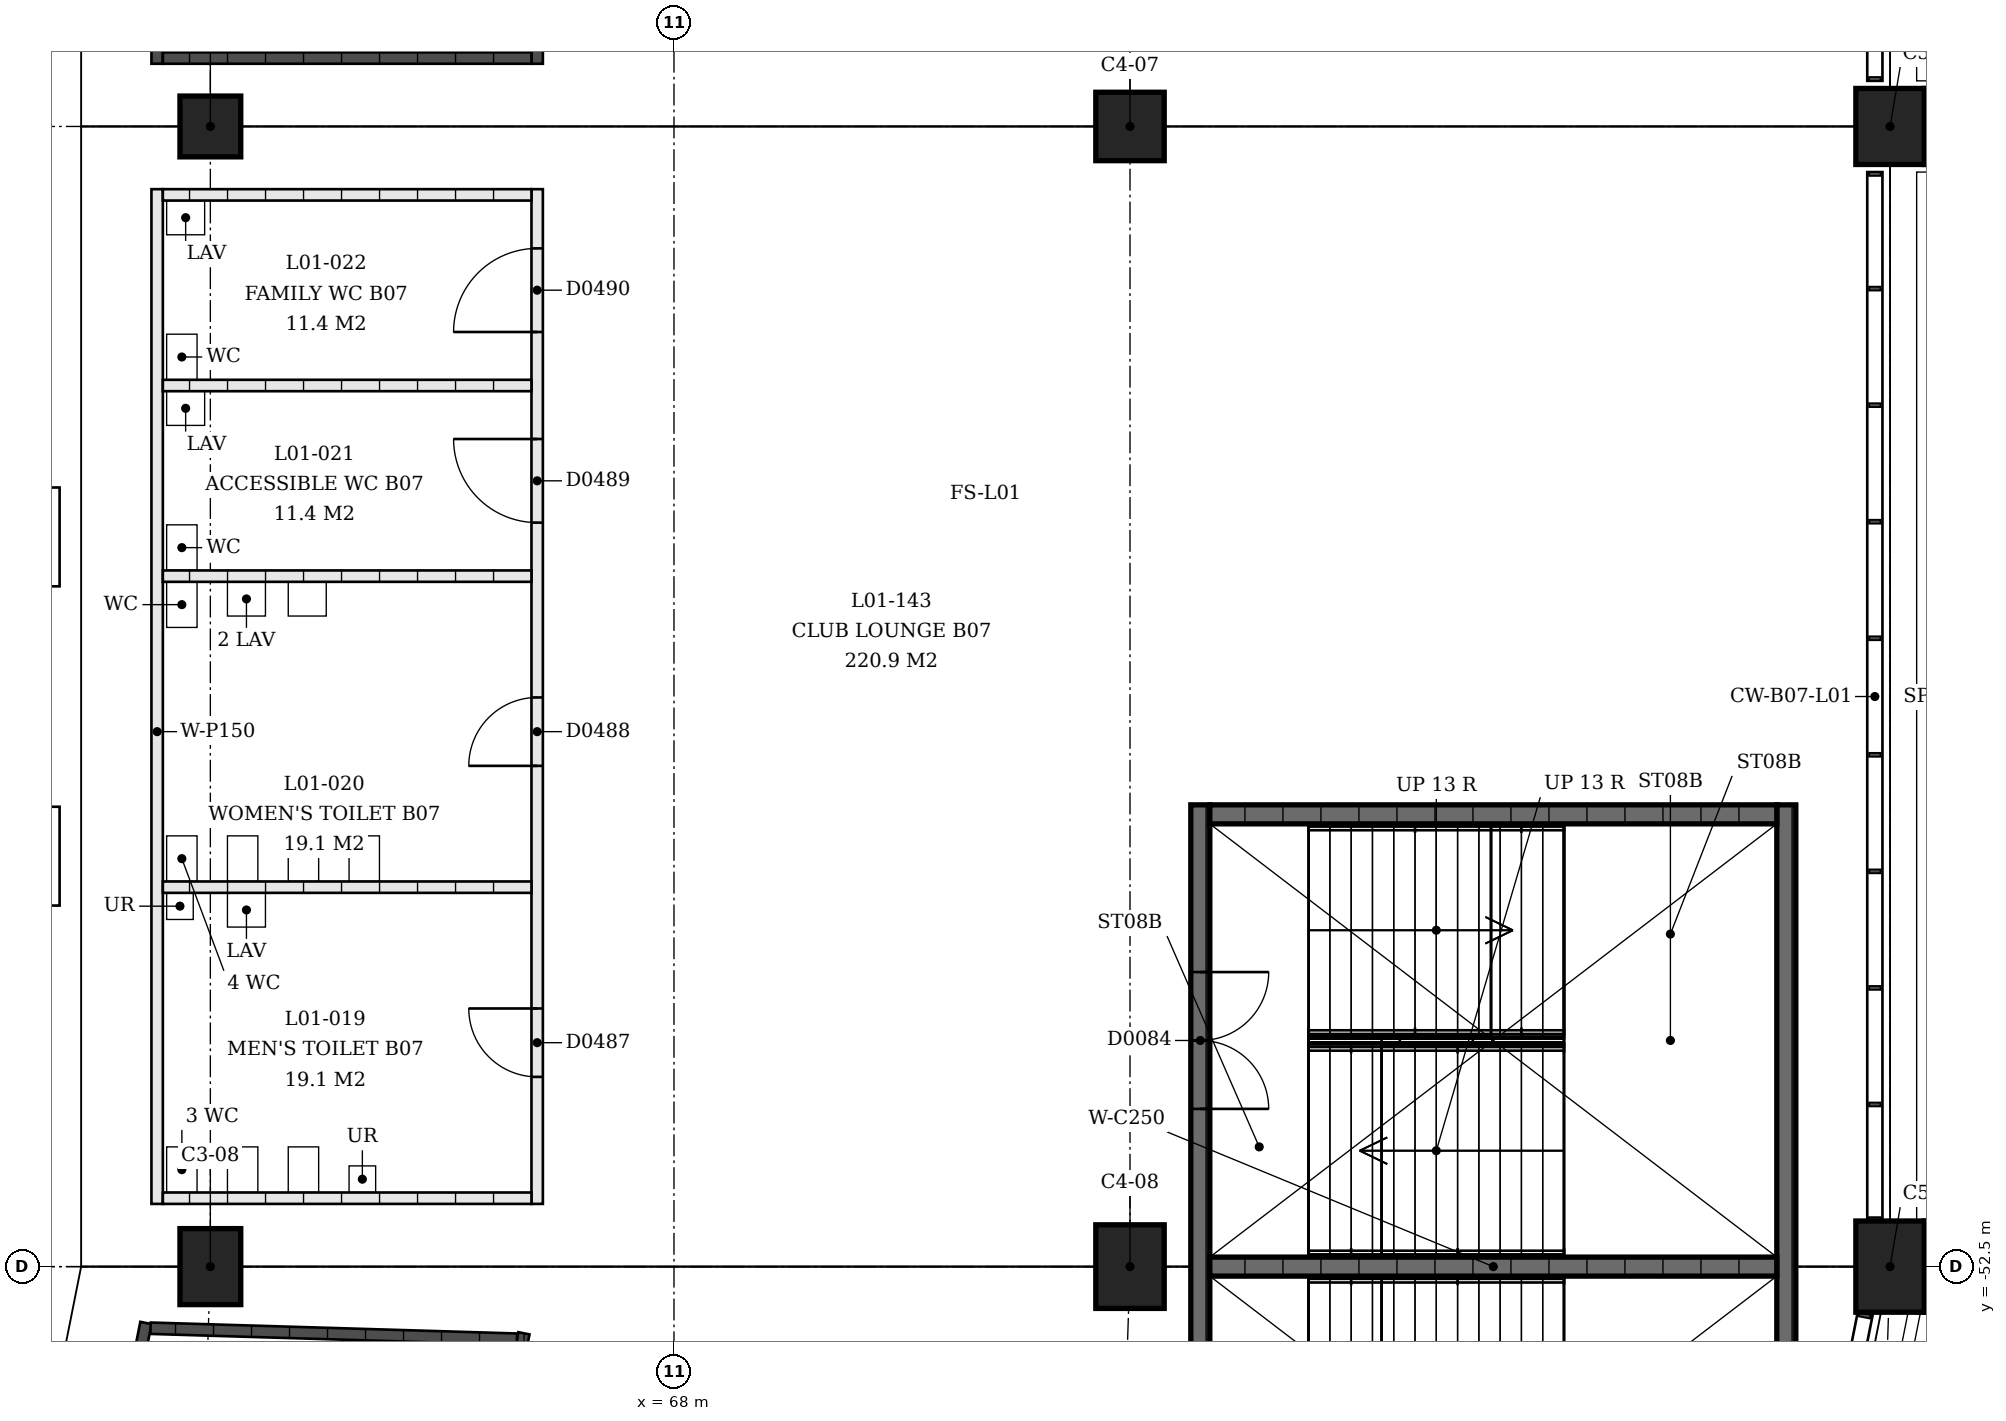
"""IFC4 building model, lengths in metres.
Left out: names, types, materials, properties, quantities, classifications, styles, units other than length and angle.
Written with IfcOpenShell. Run it as: python <this file> out.ifc"""

import sys

from ifc_helpers import new_model, si_unit, direction, frame, frame_2d, origin, origin_2d, place, context, subcontext, project, spatial, rectangle, extrude, element, fill, save


model = new_model("IFC4")
c1 = context("Model", 3, precision=1e-05, world=origin(), true_north=direction((0.0, 1.0)))
c2 = subcontext(c1, "Body", "Model", "MODEL_VIEW")
j1 = project(units=[si_unit("LENGTHUNIT", "METRE"), si_unit("PLANEANGLEUNIT", "RADIAN")], contexts=[c1])
p1 = place(None, origin())
s1 = spatial("IfcSite", under=j1, at=p1, CompositionType="ELEMENT")
p2 = place(p1, origin())
s2 = spatial("IfcBuilding", under=s1, at=p2, CompositionType="ELEMENT")
p3 = place(p2, frame((0.0, 0.0, 4.5)))
s3 = spatial("IfcBuildingStorey", under=s2, at=p3, CompositionType="ELEMENT", Elevation=4.5)
p4 = place(p3, frame((61.9, -37.5, 0.0), z_axis=(0.0, 0.0, 1.0), x_axis=(0.0, 1.0, 0.0)))
e1 = element("IfcColumn", 1, at=p4, inside=s3, PredefinedType="COLUMN", context=c2, shape_type="SweptSolid", body=[
    extrude(rectangle(XDim=0.8, YDim=0.8, at=origin_2d()), origin(), (0.0, 0.0, 1.0), 4.5),
])
p5 = place(p3, frame((74.0, -37.5, 0.0), z_axis=(0.0, 0.0, 1.0), x_axis=(0.0, 1.0, 0.0)))
e2 = element("IfcColumn", 2, at=p5, inside=s3, PredefinedType="COLUMN", context=c2, shape_type="SweptSolid", body=[
    extrude(rectangle(XDim=0.9, YDim=0.9, at=origin_2d()), origin(), (0.0, 0.0, 1.0), 4.5),
])
p6 = place(p3, frame((84.0, -37.5, 0.0), z_axis=(0.0, 0.0, 1.0), x_axis=(0.0, 1.0, 0.0)))
e3 = element("IfcColumn", 3, at=p6, inside=s3, PredefinedType="COLUMN", context=c2, shape_type="SweptSolid", body=[
    extrude(rectangle(XDim=1.0, YDim=0.9, at=origin_2d()), origin(), (0.0, 0.0, 1.0), 4.5),
])
p7 = place(p3, frame((61.9, -52.5, 0.0), z_axis=(0.0, 0.0, 1.0), x_axis=(0.0, 1.0, 0.0)))
e4 = element("IfcColumn", 4, at=p7, inside=s3, PredefinedType="COLUMN", context=c2, shape_type="SweptSolid", body=[
    extrude(rectangle(XDim=1.0, YDim=0.8, at=origin_2d()), origin(), (0.0, 0.0, 1.0), 4.5),
])
p8 = place(p3, frame((74.0, -52.5, 0.0), z_axis=(0.0, 0.0, 1.0), x_axis=(0.0, 1.0, 0.0)))
e5 = element("IfcColumn", 5, at=p8, inside=s3, PredefinedType="COLUMN", context=c2, shape_type="SweptSolid", body=[
    extrude(rectangle(XDim=1.1, YDim=0.9, at=origin_2d()), origin(), (0.0, 0.0, 1.0), 4.5),
])
p9 = place(p3, frame((84.0, -52.5, 0.0), z_axis=(0.0, 0.0, 1.0), x_axis=(0.0, 1.0, 0.0)))
e6 = element("IfcColumn", 6, at=p9, inside=s3, PredefinedType="COLUMN", context=c2, shape_type="SweptSolid", body=[
    extrude(rectangle(XDim=1.2, YDim=0.9, at=origin_2d()), origin(), (0.0, 0.0, 1.0), 4.5),
])
p10 = place(p3, frame((74.925, -58.575, 0.0), z_axis=(0.0, 0.0, 1.0), x_axis=(0.0, 1.0, 0.0)))
e7 = element("IfcWall", 7, at=p10, inside=s3, PredefinedType="SHEAR", context=c2, shape_type="SweptSolid", body=[
    extrude(rectangle(XDim=12.15, YDim=0.25, at=frame_2d((6.075, 0.0))), origin(), (0.0, 0.0, 1.0), 4.09),
])
p11 = place(p10, frame((2.2, 0.0, 0.0)))
e8 = element("IfcOpeningElement", 8, at=p11, cuts=e7, PredefinedType="OPENING", context=c2, shape_type="SweptSolid", body=[
    extrude(rectangle(XDim=1.8, YDim=2.1, at=frame_2d((0.9, 1.05))), frame((0.0, 0.125, 0.0), z_axis=(0.0, -1.0, 0.0), x_axis=(1.0, 0.0, 0.0)), (0.0, 0.0, 1.0), 0.25),
])
p12 = place(p10, frame((8.15, 0.0, 0.0)))
e9 = element("IfcOpeningElement", 9, at=p12, cuts=e7, PredefinedType="OPENING", context=c2, shape_type="SweptSolid", body=[
    extrude(rectangle(XDim=1.8, YDim=2.1, at=frame_2d((0.9, 1.05))), frame((0.0, 0.125, 0.0), z_axis=(0.0, -1.0, 0.0), x_axis=(1.0, 0.0, 0.0)), (0.0, 0.0, 1.0), 0.25),
])
p13 = place(p3, frame((82.635, -58.575, 0.0), z_axis=(0.0, 0.0, 1.0), x_axis=(0.0, 1.0, 0.0)))
e10 = element("IfcWall", 10, at=p13, inside=s3, PredefinedType="SHEAR", context=c2, shape_type="SweptSolid", body=[
    extrude(rectangle(XDim=12.15, YDim=0.25, at=frame_2d((6.075, 0.0))), origin(), (0.0, 0.0, 1.0), 4.09),
])
for number, where, z_axis, x_axis in (
    (11, (75.05, -46.55, 0.0), (0.0, 0.0, 1.0), (1.0, 0.0, 0.0)),
    (12, (75.05, -52.5, 0.0), (0.0, 0.0, 1.0), (1.0, 0.0, 0.0)),
):
    element("IfcWall", number, at=place(p3, frame(where, z_axis=z_axis, x_axis=x_axis)), inside=s3, PredefinedType="SHEAR", context=c2, shape_type="SweptSolid", body=[
        extrude(rectangle(XDim=7.46, YDim=0.25, at=frame_2d((3.73, 0.0))), origin(), (0.0, 0.0, 1.0), 4.09),
    ])
p14 = place(p3, frame((61.2, -23.325, 0.0), z_axis=(0.0, 0.0, 1.0), x_axis=(0.0, -1.0, 0.0)))
e13 = element("IfcWall", 13, at=p14, inside=s3, PredefinedType="SOLIDWALL", context=c2, shape_type="SweptSolid", body=[
    extrude(rectangle(XDim=13.35, YDim=0.15, at=frame_2d((6.675, 0.0))), origin(), (0.0, 0.0, 1.0), 3.0),
])
p15 = place(p3, frame((66.2, -23.325, 0.0), z_axis=(0.0, 0.0, 1.0), x_axis=(0.0, -1.0, 0.0)))
e14 = element("IfcWall", 14, at=p15, inside=s3, PredefinedType="SOLIDWALL", context=c2, shape_type="SweptSolid", body=[
    extrude(rectangle(XDim=13.35, YDim=0.15, at=frame_2d((6.675, 0.0))), origin(), (0.0, 0.0, 1.0), 3.0),
])
p16 = place(p15, frame((2.875, 0.0, 0.0)))
e15 = element("IfcOpeningElement", 15, at=p16, cuts=e14, PredefinedType="OPENING", context=c2, shape_type="SweptSolid", body=[
    extrude(rectangle(XDim=1.0, YDim=2.1, at=frame_2d((0.5, 1.05))), frame((0.0, 0.075, 0.0), z_axis=(0.0, -1.0, 0.0), x_axis=(1.0, 0.0, 0.0)), (0.0, 0.0, 1.0), 0.15),
])
p17 = place(p15, frame((9.475, 0.0, 0.0)))
e16 = element("IfcOpeningElement", 16, at=p17, cuts=e14, PredefinedType="OPENING", context=c2, shape_type="SweptSolid", body=[
    extrude(rectangle(XDim=1.0, YDim=2.1, at=frame_2d((0.5, 1.05))), frame((0.0, 0.075, 0.0), z_axis=(0.0, -1.0, 0.0), x_axis=(1.0, 0.0, 0.0)), (0.0, 0.0, 1.0), 0.15),
])
p18 = place(p3, frame((61.275, -36.6, 0.0), z_axis=(0.0, 0.0, 1.0), x_axis=(1.0, 0.0, 0.0)))
e17 = element("IfcWall", 17, at=p18, inside=s3, PredefinedType="SOLIDWALL", context=c2, shape_type="SweptSolid", body=[
    extrude(rectangle(XDim=4.85, YDim=0.15, at=frame_2d((2.425, 0.0))), origin(), (0.0, 0.0, 1.0), 3.0),
])
p19 = place(p3, frame((61.2, -51.675, 0.0), z_axis=(0.0, 0.0, 1.0), x_axis=(0.0, 1.0, 0.0)))
e18 = element("IfcWall", 18, at=p19, inside=s3, PredefinedType="PARTITIONING", context=c2, shape_type="SweptSolid", body=[
    extrude(rectangle(XDim=13.35, YDim=0.15, at=frame_2d((6.675, 0.0))), origin(), (0.0, 0.0, 1.0), 3.0),
])
p20 = place(p3, frame((66.2, -51.675, 0.0), z_axis=(0.0, 0.0, 1.0), x_axis=(0.0, 1.0, 0.0)))
e19 = element("IfcWall", 19, at=p20, inside=s3, PredefinedType="PARTITIONING", context=c2, shape_type="SweptSolid", body=[
    extrude(rectangle(XDim=13.35, YDim=0.15, at=frame_2d((6.675, 0.0))), origin(), (0.0, 0.0, 1.0), 3.0),
])
p21 = place(p20, frame((1.671, 0.0, 0.0)))
e20 = element("IfcOpeningElement", 20, at=p21, cuts=e19, PredefinedType="OPENING", context=c2, shape_type="SweptSolid", body=[
    extrude(rectangle(XDim=0.9, YDim=2.1, at=frame_2d((0.45, 1.05))), frame((0.0, 0.075, 0.0), z_axis=(0.0, -1.0, 0.0), x_axis=(1.0, 0.0, 0.0)), (0.0, 0.0, 1.0), 0.15),
])
p22 = place(p20, frame((5.763, 0.0, 0.0)))
e21 = element("IfcOpeningElement", 21, at=p22, cuts=e19, PredefinedType="OPENING", context=c2, shape_type="SweptSolid", body=[
    extrude(rectangle(XDim=0.9, YDim=2.1, at=frame_2d((0.45, 1.05))), frame((0.0, 0.075, 0.0), z_axis=(0.0, -1.0, 0.0), x_axis=(1.0, 0.0, 0.0)), (0.0, 0.0, 1.0), 0.15),
])
p23 = place(p20, frame((8.963, 0.0, 0.0)))
e22 = element("IfcOpeningElement", 22, at=p23, cuts=e19, PredefinedType="OPENING", context=c2, shape_type="SweptSolid", body=[
    extrude(rectangle(XDim=1.1, YDim=2.1, at=frame_2d((0.55, 1.05))), frame((0.0, 0.075, 0.0), z_axis=(0.0, -1.0, 0.0), x_axis=(1.0, 0.0, 0.0)), (0.0, 0.0, 1.0), 0.15),
])
p24 = place(p20, frame((11.471, 0.0, 0.0)))
e23 = element("IfcOpeningElement", 23, at=p24, cuts=e19, PredefinedType="OPENING", context=c2, shape_type="SweptSolid", body=[
    extrude(rectangle(XDim=1.1, YDim=2.1, at=frame_2d((0.55, 1.05))), frame((0.0, 0.075, 0.0), z_axis=(0.0, -1.0, 0.0), x_axis=(1.0, 0.0, 0.0)), (0.0, 0.0, 1.0), 0.15),
])
for number, where, z_axis, x_axis in (
    (24, (61.275, -51.6, 0.0), (0.0, 0.0, 1.0), (1.0, 0.0, 0.0)),
    (25, (61.275, -47.508, 0.0), (0.0, 0.0, 1.0), (1.0, 0.0, 0.0)),
    (26, (61.275, -43.416, 0.0), (0.0, 0.0, 1.0), (1.0, 0.0, 0.0)),
    (27, (61.275, -40.908, 0.0), (0.0, 0.0, 1.0), (1.0, 0.0, 0.0)),
    (28, (61.275, -38.4, 0.0), (0.0, 0.0, 1.0), (1.0, 0.0, 0.0)),
):
    element("IfcWall", number, at=place(p3, frame(where, z_axis=z_axis, x_axis=x_axis)), inside=s3, PredefinedType="PARTITIONING", context=c2, shape_type="SweptSolid", body=[
        extrude(rectangle(XDim=4.85, YDim=0.15, at=frame_2d((2.425, 0.0))), origin(), (0.0, 0.0, 1.0), 3.0),
    ])
p25 = place(p3, frame((61.052, -53.241, 0.0), z_axis=(0.0, 0.0, 1.0), x_axis=(-0.195075759432, -0.980788176969, 0.0)))
e29 = element("IfcWall", 29, at=p25, inside=s3, PredefinedType="SOLIDWALL", context=c2, shape_type="SweptSolid", body=[
    extrude(rectangle(XDim=9.388, YDim=0.15, at=frame_2d((4.694, 0.0))), origin(), (0.0, 0.0, 1.0), 3.0),
])
p26 = place(p3, frame((66.025, -53.377, 0.0), z_axis=(0.0, 0.0, 1.0), x_axis=(-0.195076764682, -0.980787977027, 0.0)))
e30 = element("IfcWall", 30, at=p26, inside=s3, PredefinedType="SOLIDWALL", context=c2, shape_type="SweptSolid", body=[
    extrude(rectangle(XDim=11.114, YDim=0.15, at=frame_2d((5.557, 0.0))), origin(), (0.0, 0.0, 1.0), 3.0),
])
p27 = place(p26, frame((2.319, 0.0, 0.0)))
e31 = element("IfcOpeningElement", 31, at=p27, cuts=e30, PredefinedType="OPENING", context=c2, shape_type="SweptSolid", body=[
    extrude(rectangle(XDim=1.0, YDim=2.1, at=frame_2d((0.5, 1.05))), frame((0.0, 0.075, 0.0), z_axis=(0.0, -1.0, 0.0), x_axis=(1.0, 0.0, 0.0)), (0.0, 0.0, 1.0), 0.15),
])
p28 = place(p26, frame((7.794, 0.0, 0.0)))
e32 = element("IfcOpeningElement", 32, at=p28, cuts=e30, PredefinedType="OPENING", context=c2, shape_type="SweptSolid", body=[
    extrude(rectangle(XDim=1.0, YDim=2.1, at=frame_2d((0.5, 1.05))), frame((0.0, 0.075, 0.0), z_axis=(0.0, -1.0, 0.0), x_axis=(1.0, 0.0, 0.0)), (0.0, 0.0, 1.0), 0.15),
])
p29 = place(p3, frame((61.114, -53.311, 0.0), z_axis=(0.0, 0.0, 1.0), x_axis=(0.999552485488, -0.02991368842, 0.0)))
e33 = element("IfcWall", 33, at=p29, inside=s3, PredefinedType="SOLIDWALL", context=c2, shape_type="SweptSolid", body=[
    extrude(rectangle(XDim=4.823, YDim=0.15, at=frame_2d((2.412, 0.0))), origin(), (0.0, 0.0, 1.0), 3.0),
])
p30 = place(p12, origin())
e34 = element("IfcDoor", 34, at=p30, inside=s3, OperationType="DOUBLE_DOOR_SINGLE_SWING", PredefinedType="DOOR", context=c2, shape_type="SweptSolid", body=[
    extrude(rectangle(XDim=1.8, YDim=2.1, at=frame_2d((0.9, 1.05))), frame((0.0, 0.025, 0.0), z_axis=(0.0, -1.0, 0.0), x_axis=(1.0, 0.0, 0.0)), (0.0, 0.0, 1.0), 0.05),
])
fill(e9, e34)
p31 = place(p21, origin())
e35 = element("IfcDoor", 35, at=p31, inside=s3, OperationType="SINGLE_SWING_LEFT", PredefinedType="DOOR", context=c2, shape_type="SweptSolid", body=[
    extrude(rectangle(XDim=0.9, YDim=2.1, at=frame_2d((0.45, 1.05))), frame((0.0, 0.025, 0.0), z_axis=(0.0, -1.0, 0.0), x_axis=(1.0, 0.0, 0.0)), (0.0, 0.0, 1.0), 0.05),
])
fill(e20, e35)
p32 = place(p22, origin())
e36 = element("IfcDoor", 36, at=p32, inside=s3, OperationType="SINGLE_SWING_RIGHT", PredefinedType="DOOR", context=c2, shape_type="SweptSolid", body=[
    extrude(rectangle(XDim=0.9, YDim=2.1, at=frame_2d((0.45, 1.05))), frame((0.0, 0.025, 0.0), z_axis=(0.0, -1.0, 0.0), x_axis=(1.0, 0.0, 0.0)), (0.0, 0.0, 1.0), 0.05),
])
fill(e21, e36)
p33 = place(p23, origin())
e37 = element("IfcDoor", 37, at=p33, inside=s3, OperationType="SINGLE_SWING_LEFT", PredefinedType="DOOR", context=c2, shape_type="SweptSolid", body=[
    extrude(rectangle(XDim=1.1, YDim=2.1, at=frame_2d((0.55, 1.05))), frame((0.0, 0.025, 0.0), z_axis=(0.0, -1.0, 0.0), x_axis=(1.0, 0.0, 0.0)), (0.0, 0.0, 1.0), 0.05),
])
fill(e22, e37)
p34 = place(p24, origin())
e38 = element("IfcDoor", 38, at=p34, inside=s3, OperationType="SINGLE_SWING_RIGHT", PredefinedType="DOOR", context=c2, shape_type="SweptSolid", body=[
    extrude(rectangle(XDim=1.1, YDim=2.1, at=frame_2d((0.55, 1.05))), frame((0.0, 0.025, 0.0), z_axis=(0.0, -1.0, 0.0), x_axis=(1.0, 0.0, 0.0)), (0.0, 0.0, 1.0), 0.05),
])
fill(e23, e38)
save(model, sys.argv[1])
